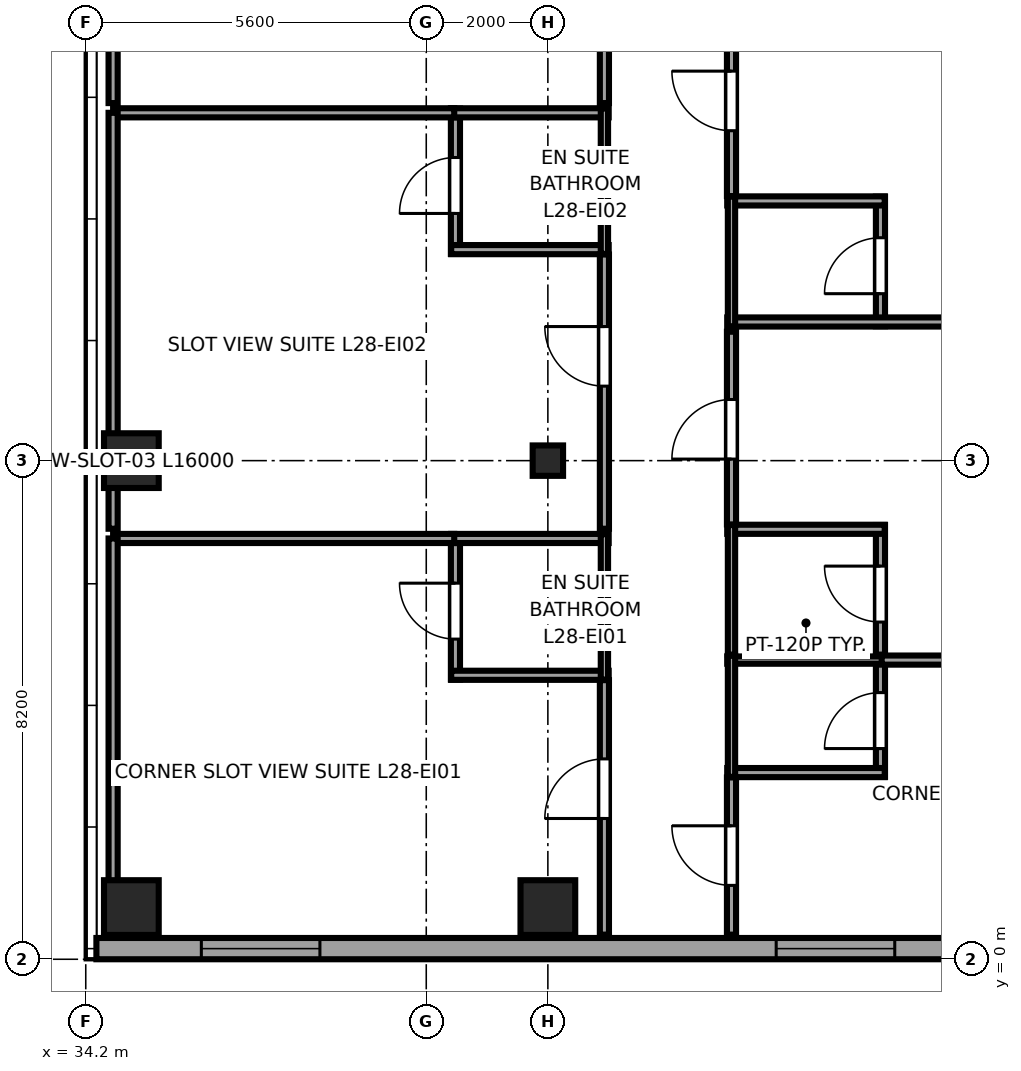
"""IFC4 building model, lengths in metres.
Left out: names, types, materials, properties, quantities, classifications, styles, units other than length and angle.
Written with IfcOpenShell. Run it as: python <this file> out.ifc"""

import sys

from ifc_helpers import new_model, si_unit, direction, frame, frame_2d, origin, origin_2d, place, context, subcontext, project, spatial, rectangle, i_section, extrude, source, transform, mapped, element, fill, save


model = new_model("IFC4")
c1 = context("Model", 3, precision=1e-05, world=origin(), true_north=direction((0.0, 1.0)))
c2 = subcontext(c1, "Body", "Model", "MODEL_VIEW")
j1 = project(units=[si_unit("LENGTHUNIT", "METRE"), si_unit("PLANEANGLEUNIT", "RADIAN")], contexts=[c1])
p1 = place(None, origin())
s1 = spatial("IfcSite", under=j1, at=p1, CompositionType="ELEMENT")
p2 = place(p1, origin())
s2 = spatial("IfcBuilding", under=s1, at=p2, CompositionType="ELEMENT")
p3 = place(p2, frame((0.0, 0.0, 111.55)))
s3 = spatial("IfcBuildingStorey", under=s2, at=p3, CompositionType="ELEMENT", Elevation=111.55)
m1 = source(origin(), c2, "Body", "SweptSolid", [
    extrude(rectangle(XDim=0.9, YDim=0.9, at=origin_2d()), origin(), (0.0, 0.0, 1.0), 3.55),
])
for number, where, z_axis, x_axis in (
    (1, (34.95, 0.85, 0.0), (0.0, 0.0, 1.0), (1.0, 0.0, 0.0)),
    (2, (34.95, 8.2, 0.0), (0.0, 0.0, 1.0), (1.0, 0.0, 0.0)),
    (3, (41.8, 0.85, 0.0), (0.0, 0.0, 1.0), (1.0, 0.0, 0.0)),
):
    element("IfcColumn", number, at=place(p3, frame(where, z_axis=z_axis, x_axis=x_axis)), inside=s3, PredefinedType="COLUMN", context=c2, shape_type="MappedRepresentation", body=[
        mapped(m1, transform((0.0, 0.0, 0.0), x_axis=(1.0, 0.0, 0.0), y_axis=(0.0, 1.0, 0.0), z_axis=(0.0, 0.0, 1.0), scale=1.0)),
    ])
m2 = source(origin(), c2, "Body", "SweptSolid", [
    extrude(i_section(OverallWidth=0.5, OverallDepth=0.5, WebThickness=0.022, FlangeThickness=0.034, at=origin_2d()), origin(), (0.0, 0.0, 1.0), 3.55),
])
p4 = place(p3, frame((41.8, 8.2, 0.0), z_axis=(0.0, 0.0, 1.0), x_axis=(1.0, 0.0, 0.0)))
e4 = element("IfcColumn", 4, at=p4, inside=s3, PredefinedType="COLUMN", context=c2, shape_type="MappedRepresentation", body=[
    mapped(m2, transform((0.0, 0.0, 0.0), x_axis=(1.0, 0.0, 0.0), y_axis=(0.0, 1.0, 0.0), z_axis=(0.0, 0.0, 1.0), scale=1.0)),
])
p5 = place(p3, frame((34.375, 0.175, 0.0), z_axis=(0.0, 0.0, 1.0), x_axis=(1.0, 0.0, 0.0)))
e5 = element("IfcWall", 5, at=p5, inside=s3, PredefinedType="SOLIDWALL", context=c2, shape_type="SweptSolid", body=[
    extrude(rectangle(XDim=18.008, YDim=0.35, at=frame_2d((9.004, 0.0))), origin(), (0.0, 0.0, 1.0), 3.37),
])
p6 = place(p5, frame((1.726, 0.0, 0.68)))
e6 = element("IfcOpeningElement", 6, at=p6, cuts=e5, PredefinedType="OPENING", context=c2, shape_type="SweptSolid", body=[
    extrude(rectangle(XDim=1.95, YDim=1.82, at=frame_2d((0.975, 0.91))), frame((0.0, 0.185, 0.0), z_axis=(0.0, -1.0, 0.0), x_axis=(1.0, 0.0, 0.0)), (0.0, 0.0, 1.0), 0.37),
])
p7 = place(p5, frame((11.18, 0.0, 0.68)))
e7 = element("IfcOpeningElement", 7, at=p7, cuts=e5, PredefinedType="OPENING", context=c2, shape_type="SweptSolid", body=[
    extrude(rectangle(XDim=1.95, YDim=1.82, at=frame_2d((0.975, 0.91))), frame((0.0, 0.185, 0.0), z_axis=(0.0, -1.0, 0.0), x_axis=(1.0, 0.0, 0.0)), (0.0, 0.0, 1.0), 0.37),
])
p8 = place(p3, frame((40.28, 4.6, 0.0), z_axis=(0.0, 0.0, 1.0), x_axis=(0.0, 1.0, 0.0)))
e8 = element("IfcWall", 8, at=p8, inside=s3, PredefinedType="PARTITIONING", context=c2, shape_type="SweptSolid", body=[
    extrude(rectangle(XDim=2.39, YDim=0.15, at=frame_2d((1.195, 0.0))), origin(), (0.0, 0.0, 1.0), 3.37),
])
p9 = place(p8, frame((0.665, 0.0, 0.0)))
e9 = element("IfcOpeningElement", 9, at=p9, cuts=e8, PredefinedType="OPENING", context=c2, shape_type="SweptSolid", body=[
    extrude(rectangle(XDim=0.92, YDim=2.01, at=frame_2d((0.46, 1.005))), frame((0.0, 0.085, 0.0), z_axis=(0.0, -1.0, 0.0), x_axis=(1.0, 0.0, 0.0)), (0.0, 0.0, 1.0), 0.17),
])
for number, where, z_axis, x_axis in (
    (10, (40.21, 4.67, 0.0), (0.0, 0.0, 1.0), (1.0, 0.0, 0.0)),
    (11, (40.21, 6.92, 0.0), (0.0, 0.0, 1.0), (1.0, 0.0, 0.0)),
):
    element("IfcWall", number, at=place(p3, frame(where, z_axis=z_axis, x_axis=x_axis)), inside=s3, PredefinedType="PARTITIONING", context=c2, shape_type="SweptSolid", body=[
        extrude(rectangle(XDim=2.59, YDim=0.15, at=frame_2d((1.295, 0.0))), origin(), (0.0, 0.0, 1.0), 3.37),
    ])
p10 = place(p3, frame((42.73, 4.6, 0.0), z_axis=(0.0, 0.0, 1.0), x_axis=(0.0, 1.0, 0.0)))
e12 = element("IfcWall", 12, at=p10, inside=s3, PredefinedType="PLUMBINGWALL", context=c2, shape_type="SweptSolid", body=[
    extrude(rectangle(XDim=2.39, YDim=0.12, at=frame_2d((1.195, 0.0))), origin(), (0.0, 0.0, 1.0), 3.37),
])
p11 = place(p3, frame((40.28, 11.6, 0.0), z_axis=(0.0, 0.0, 1.0), x_axis=(0.0, 1.0, 0.0)))
e13 = element("IfcWall", 13, at=p11, inside=s3, PredefinedType="PARTITIONING", context=c2, shape_type="SweptSolid", body=[
    extrude(rectangle(XDim=2.39, YDim=0.15, at=frame_2d((1.195, 0.0))), origin(), (0.0, 0.0, 1.0), 3.37),
])
p12 = place(p11, frame((0.665, 0.0, 0.0)))
e14 = element("IfcOpeningElement", 14, at=p12, cuts=e13, PredefinedType="OPENING", context=c2, shape_type="SweptSolid", body=[
    extrude(rectangle(XDim=0.92, YDim=2.01, at=frame_2d((0.46, 1.005))), frame((0.0, 0.085, 0.0), z_axis=(0.0, -1.0, 0.0), x_axis=(1.0, 0.0, 0.0)), (0.0, 0.0, 1.0), 0.17),
])
for number, where, z_axis, x_axis in (
    (15, (40.21, 11.67, 0.0), (0.0, 0.0, 1.0), (1.0, 0.0, 0.0)),
    (16, (40.21, 13.92, 0.0), (0.0, 0.0, 1.0), (1.0, 0.0, 0.0)),
):
    element("IfcWall", number, at=place(p3, frame(where, z_axis=z_axis, x_axis=x_axis)), inside=s3, PredefinedType="PARTITIONING", context=c2, shape_type="SweptSolid", body=[
        extrude(rectangle(XDim=2.59, YDim=0.15, at=frame_2d((1.295, 0.0))), origin(), (0.0, 0.0, 1.0), 3.37),
    ])
p13 = place(p3, frame((42.73, 11.6, 0.0), z_axis=(0.0, 0.0, 1.0), x_axis=(0.0, 1.0, 0.0)))
e17 = element("IfcWall", 17, at=p13, inside=s3, PredefinedType="PLUMBINGWALL", context=c2, shape_type="SweptSolid", body=[
    extrude(rectangle(XDim=2.39, YDim=0.12, at=frame_2d((1.195, 0.0))), origin(), (0.0, 0.0, 1.0), 3.37),
])
p14 = place(p3, frame((47.27, 3.0, 0.0), z_axis=(0.0, 0.0, 1.0), x_axis=(0.0, 1.0, 0.0)))
e18 = element("IfcWall", 18, at=p14, inside=s3, PredefinedType="PARTITIONING", context=c2, shape_type="SweptSolid", body=[
    extrude(rectangle(XDim=1.99, YDim=0.15, at=frame_2d((0.995, 0.0))), origin(), (0.0, 0.0, 1.0), 3.37),
])
p15 = place(p14, frame((0.465, 0.0, 0.0)))
e19 = element("IfcOpeningElement", 19, at=p15, cuts=e18, PredefinedType="OPENING", context=c2, shape_type="SweptSolid", body=[
    extrude(rectangle(XDim=0.92, YDim=2.01, at=frame_2d((0.46, 1.005))), frame((0.0, 0.085, 0.0), z_axis=(0.0, -1.0, 0.0), x_axis=(1.0, 0.0, 0.0)), (0.0, 0.0, 1.0), 0.17),
])
p16 = place(p3, frame((44.75, 3.07, 0.0), z_axis=(0.0, 0.0, 1.0), x_axis=(1.0, 0.0, 0.0)))
e20 = element("IfcWall", 20, at=p16, inside=s3, PredefinedType="PARTITIONING", context=c2, shape_type="SweptSolid", body=[
    extrude(rectangle(XDim=2.59, YDim=0.15, at=frame_2d((1.295, 0.0))), origin(), (0.0, 0.0, 1.0), 3.37),
])
p17 = place(p3, frame((44.75, 4.92, 0.0), z_axis=(0.0, 0.0, 1.0), x_axis=(1.0, 0.0, 0.0)))
e21 = element("IfcWall", 21, at=p17, inside=s3, PredefinedType="PLUMBINGWALL", context=c2, shape_type="SweptSolid", body=[
    extrude(rectangle(XDim=2.59, YDim=0.12, at=frame_2d((1.295, 0.0))), origin(), (0.0, 0.0, 1.0), 3.37),
])
p18 = place(p3, frame((44.82, 3.0, 0.0), z_axis=(0.0, 0.0, 1.0), x_axis=(0.0, 1.0, 0.0)))
e22 = element("IfcWall", 22, at=p18, inside=s3, PredefinedType="PLUMBINGWALL", context=c2, shape_type="SweptSolid", body=[
    extrude(rectangle(XDim=1.99, YDim=0.12, at=frame_2d((0.995, 0.0))), origin(), (0.0, 0.0, 1.0), 3.37),
])
p19 = place(p3, frame((47.27, 5.01, 0.0), z_axis=(0.0, 0.0, 1.0), x_axis=(0.0, 1.0, 0.0)))
e23 = element("IfcWall", 23, at=p19, inside=s3, PredefinedType="PARTITIONING", context=c2, shape_type="SweptSolid", body=[
    extrude(rectangle(XDim=2.131, YDim=0.15, at=frame_2d((1.065, 0.0))), origin(), (0.0, 0.0, 1.0), 3.37),
])
p20 = place(p19, frame((0.535, 0.0, 0.0)))
e24 = element("IfcOpeningElement", 24, at=p20, cuts=e23, PredefinedType="OPENING", context=c2, shape_type="SweptSolid", body=[
    extrude(rectangle(XDim=0.92, YDim=2.01, at=frame_2d((0.46, 1.005))), frame((0.0, 0.085, 0.0), z_axis=(0.0, -1.0, 0.0), x_axis=(1.0, 0.0, 0.0)), (0.0, 0.0, 1.0), 0.17),
])
p21 = place(p3, frame((44.75, 7.071, 0.0), z_axis=(0.0, 0.0, 1.0), x_axis=(1.0, 0.0, 0.0)))
e25 = element("IfcWall", 25, at=p21, inside=s3, PredefinedType="PARTITIONING", context=c2, shape_type="SweptSolid", body=[
    extrude(rectangle(XDim=2.59, YDim=0.15, at=frame_2d((1.295, 0.0))), origin(), (0.0, 0.0, 1.0), 3.37),
])
p22 = place(p3, frame((44.82, 5.01, 0.0), z_axis=(0.0, 0.0, 1.0), x_axis=(0.0, 1.0, 0.0)))
e26 = element("IfcWall", 26, at=p22, inside=s3, PredefinedType="PLUMBINGWALL", context=c2, shape_type="SweptSolid", body=[
    extrude(rectangle(XDim=2.131, YDim=0.12, at=frame_2d((1.065, 0.0))), origin(), (0.0, 0.0, 1.0), 3.37),
])
p23 = place(p3, frame((47.27, 10.41, 0.0), z_axis=(0.0, 0.0, 1.0), x_axis=(0.0, 1.0, 0.0)))
e27 = element("IfcWall", 27, at=p23, inside=s3, PredefinedType="PARTITIONING", context=c2, shape_type="SweptSolid", body=[
    extrude(rectangle(XDim=2.131, YDim=0.15, at=frame_2d((1.065, 0.0))), origin(), (0.0, 0.0, 1.0), 3.37),
])
p24 = place(p23, frame((0.535, 0.0, 0.0)))
e28 = element("IfcOpeningElement", 28, at=p24, cuts=e27, PredefinedType="OPENING", context=c2, shape_type="SweptSolid", body=[
    extrude(rectangle(XDim=0.92, YDim=2.01, at=frame_2d((0.46, 1.005))), frame((0.0, 0.085, 0.0), z_axis=(0.0, -1.0, 0.0), x_axis=(1.0, 0.0, 0.0)), (0.0, 0.0, 1.0), 0.17),
])
p25 = place(p3, frame((44.75, 10.48, 0.0), z_axis=(0.0, 0.0, 1.0), x_axis=(1.0, 0.0, 0.0)))
e29 = element("IfcWall", 29, at=p25, inside=s3, PredefinedType="PARTITIONING", context=c2, shape_type="SweptSolid", body=[
    extrude(rectangle(XDim=11.845, YDim=0.15, at=frame_2d((5.922, 0.0))), origin(), (0.0, 0.0, 1.0), 3.37),
])
p26 = place(p3, frame((44.75, 12.471, 0.0), z_axis=(0.0, 0.0, 1.0), x_axis=(1.0, 0.0, 0.0)))
e30 = element("IfcWall", 30, at=p26, inside=s3, PredefinedType="PARTITIONING", context=c2, shape_type="SweptSolid", body=[
    extrude(rectangle(XDim=2.59, YDim=0.15, at=frame_2d((1.295, 0.0))), origin(), (0.0, 0.0, 1.0), 3.37),
])
p27 = place(p3, frame((44.82, 10.41, 0.0), z_axis=(0.0, 0.0, 1.0), x_axis=(0.0, 1.0, 0.0)))
e31 = element("IfcWall", 31, at=p27, inside=s3, PredefinedType="PLUMBINGWALL", context=c2, shape_type="SweptSolid", body=[
    extrude(rectangle(XDim=2.131, YDim=0.12, at=frame_2d((1.065, 0.0))), origin(), (0.0, 0.0, 1.0), 3.37),
])
p28 = place(p3, frame((42.73, 0.405, 0.0), z_axis=(0.0, 0.0, 1.0), x_axis=(0.0, 1.0, 0.0)))
e32 = element("IfcWall", 32, at=p28, inside=s3, PredefinedType="PARTITIONING", context=c2, shape_type="SweptSolid", body=[
    extrude(rectangle(XDim=4.185, YDim=0.15, at=frame_2d((2.093, 0.0))), origin(), (0.0, 0.0, 1.0), 3.37),
])
p29 = place(p28, frame((1.91, 0.0, 0.0)))
e33 = element("IfcOpeningElement", 33, at=p29, cuts=e32, PredefinedType="OPENING", context=c2, shape_type="SweptSolid", body=[
    extrude(rectangle(XDim=0.98, YDim=2.12, at=frame_2d((0.49, 1.06))), frame((0.0, 0.085, 0.0), z_axis=(0.0, -1.0, 0.0), x_axis=(1.0, 0.0, 0.0)), (0.0, 0.0, 1.0), 0.17),
])
p30 = place(p3, frame((34.65, 6.92, 0.0), z_axis=(0.0, 0.0, 1.0), x_axis=(1.0, 0.0, 0.0)))
e34 = element("IfcWall", 34, at=p30, inside=s3, PredefinedType="PARTITIONING", context=c2, shape_type="SweptSolid", body=[
    extrude(rectangle(XDim=5.61, YDim=0.15, at=frame_2d((2.805, 0.0))), origin(), (0.0, 0.0, 1.0), 3.37),
])
p31 = place(p3, frame((34.65, 0.405, 0.0), z_axis=(0.0, 0.0, 1.0), x_axis=(0.0, 1.0, 0.0)))
e35 = element("IfcWall", 35, at=p31, inside=s3, PredefinedType="PARTITIONING", context=c2, shape_type="SweptSolid", body=[
    extrude(rectangle(XDim=6.515, YDim=0.15, at=frame_2d((3.257, 0.0))), origin(), (0.0, 0.0, 1.0), 3.37),
])
p32 = place(p3, frame((42.73, 7.08, 0.0), z_axis=(0.0, 0.0, 1.0), x_axis=(0.0, 1.0, 0.0)))
e36 = element("IfcWall", 36, at=p32, inside=s3, PredefinedType="PARTITIONING", context=c2, shape_type="SweptSolid", body=[
    extrude(rectangle(XDim=4.51, YDim=0.15, at=frame_2d((2.255, 0.0))), origin(), (0.0, 0.0, 1.0), 3.37),
])
p33 = place(p32, frame((2.345, 0.0, 0.0)))
e37 = element("IfcOpeningElement", 37, at=p33, cuts=e36, PredefinedType="OPENING", context=c2, shape_type="SweptSolid", body=[
    extrude(rectangle(XDim=0.98, YDim=2.12, at=frame_2d((0.49, 1.06))), frame((0.0, 0.085, 0.0), z_axis=(0.0, -1.0, 0.0), x_axis=(1.0, 0.0, 0.0)), (0.0, 0.0, 1.0), 0.17),
])
p34 = place(p3, frame((34.65, 13.92, 0.0), z_axis=(0.0, 0.0, 1.0), x_axis=(1.0, 0.0, 0.0)))
e38 = element("IfcWall", 38, at=p34, inside=s3, PredefinedType="PARTITIONING", context=c2, shape_type="SweptSolid", body=[
    extrude(rectangle(XDim=5.61, YDim=0.15, at=frame_2d((2.805, 0.0))), origin(), (0.0, 0.0, 1.0), 3.37),
])
p35 = place(p3, frame((34.65, 7.08, 0.0), z_axis=(0.0, 0.0, 1.0), x_axis=(0.0, 1.0, 0.0)))
e39 = element("IfcWall", 39, at=p35, inside=s3, PredefinedType="PARTITIONING", context=c2, shape_type="SweptSolid", body=[
    extrude(rectangle(XDim=6.84, YDim=0.15, at=frame_2d((3.42, 0.0))), origin(), (0.0, 0.0, 1.0), 3.37),
])
p36 = place(p3, frame((42.73, 14.08, 0.0), z_axis=(0.0, 0.0, 1.0), x_axis=(0.0, 1.0, 0.0)))
e40 = element("IfcWall", 40, at=p36, inside=s3, PredefinedType="PARTITIONING", context=c2, shape_type="SweptSolid", body=[
    extrude(rectangle(XDim=4.61, YDim=0.15, at=frame_2d((2.305, 0.0))), origin(), (0.0, 0.0, 1.0), 3.37),
])
p37 = place(p36, frame((3.145, 0.0, 0.0)))
e41 = element("IfcOpeningElement", 41, at=p37, cuts=e40, PredefinedType="OPENING", context=c2, shape_type="SweptSolid", body=[
    extrude(rectangle(XDim=0.98, YDim=2.12, at=frame_2d((0.49, 1.06))), frame((0.0, 0.085, 0.0), z_axis=(0.0, -1.0, 0.0), x_axis=(1.0, 0.0, 0.0)), (0.0, 0.0, 1.0), 0.17),
])
p38 = place(p3, frame((34.65, 14.08, 0.0), z_axis=(0.0, 0.0, 1.0), x_axis=(0.0, 1.0, 0.0)))
e42 = element("IfcWall", 42, at=p38, inside=s3, PredefinedType="PARTITIONING", context=c2, shape_type="SweptSolid", body=[
    extrude(rectangle(XDim=6.94, YDim=0.15, at=frame_2d((3.47, 0.0))), origin(), (0.0, 0.0, 1.0), 3.37),
])
p39 = place(p3, frame((44.82, 0.405, 0.0), z_axis=(0.0, 0.0, 1.0), x_axis=(0.0, 1.0, 0.0)))
e43 = element("IfcWall", 43, at=p39, inside=s3, PredefinedType="PARTITIONING", context=c2, shape_type="SweptSolid", body=[
    extrude(rectangle(XDim=2.585, YDim=0.15, at=frame_2d((1.292, 0.0))), origin(), (0.0, 0.0, 1.0), 3.37),
])
p40 = place(p39, frame((0.81, 0.0, 0.0)))
e44 = element("IfcOpeningElement", 44, at=p40, cuts=e43, PredefinedType="OPENING", context=c2, shape_type="SweptSolid", body=[
    extrude(rectangle(XDim=0.98, YDim=2.12, at=frame_2d((0.49, 1.06))), frame((0.0, 0.085, 0.0), z_axis=(0.0, -1.0, 0.0), x_axis=(1.0, 0.0, 0.0)), (0.0, 0.0, 1.0), 0.17),
])
p41 = place(p3, frame((47.29, 4.92, 0.0), z_axis=(0.0, 0.0, 1.0), x_axis=(1.0, 0.0, 0.0)))
e45 = element("IfcWall", 45, at=p41, inside=s3, PredefinedType="PARTITIONING", context=c2, shape_type="SweptSolid", body=[
    extrude(rectangle(XDim=9.305, YDim=0.15, at=frame_2d((4.652, 0.0))), origin(), (0.0, 0.0, 1.0), 3.37),
])
p42 = place(p3, frame((44.82, 7.151, 0.0), z_axis=(0.0, 0.0, 1.0), x_axis=(0.0, 1.0, 0.0)))
e46 = element("IfcWall", 46, at=p42, inside=s3, PredefinedType="PARTITIONING", context=c2, shape_type="SweptSolid", body=[
    extrude(rectangle(XDim=3.169, YDim=0.15, at=frame_2d((1.584, 0.0))), origin(), (0.0, 0.0, 1.0), 3.37),
])
p43 = place(p42, frame((1.074, 0.0, 0.0)))
e47 = element("IfcOpeningElement", 47, at=p43, cuts=e46, PredefinedType="OPENING", context=c2, shape_type="SweptSolid", body=[
    extrude(rectangle(XDim=0.98, YDim=2.12, at=frame_2d((0.49, 1.06))), frame((0.0, 0.085, 0.0), z_axis=(0.0, -1.0, 0.0), x_axis=(1.0, 0.0, 0.0)), (0.0, 0.0, 1.0), 0.17),
])
p44 = place(p3, frame((44.82, 12.551, 0.0), z_axis=(0.0, 0.0, 1.0), x_axis=(0.0, 1.0, 0.0)))
e48 = element("IfcWall", 48, at=p44, inside=s3, PredefinedType="PARTITIONING", context=c2, shape_type="SweptSolid", body=[
    extrude(rectangle(XDim=3.169, YDim=0.15, at=frame_2d((1.584, 0.0))), origin(), (0.0, 0.0, 1.0), 3.37),
])
p45 = place(p44, frame((1.074, 0.0, 0.0)))
e49 = element("IfcOpeningElement", 49, at=p45, cuts=e48, PredefinedType="OPENING", context=c2, shape_type="SweptSolid", body=[
    extrude(rectangle(XDim=0.98, YDim=2.12, at=frame_2d((0.49, 1.06))), frame((0.0, 0.085, 0.0), z_axis=(0.0, -1.0, 0.0), x_axis=(1.0, 0.0, 0.0)), (0.0, 0.0, 1.0), 0.17),
])
m3 = source(origin(), c2, "Body", "SweptSolid", [
    extrude(rectangle(XDim=1.95, YDim=1.82, at=frame_2d((0.975, 0.91))), frame((0.0, 0.09, 0.0), z_axis=(0.0, -1.0, 0.0), x_axis=(1.0, 0.0, 0.0)), (0.0, 0.0, 1.0), 0.06),
])
p46 = place(p6, origin())
e50 = element("IfcWindow", 50, at=p46, inside=s3, PartitioningType="DOUBLE_PANEL_VERTICAL", PredefinedType="WINDOW", context=c2, shape_type="MappedRepresentation", body=[
    mapped(m3, transform((0.0, 0.0, 0.0), x_axis=(1.0, 0.0, 0.0), y_axis=(0.0, 1.0, 0.0), z_axis=(0.0, 0.0, 1.0), scale=1.0)),
])
fill(e6, e50)
p47 = place(p7, origin())
e51 = element("IfcWindow", 51, at=p47, inside=s3, PartitioningType="DOUBLE_PANEL_VERTICAL", PredefinedType="WINDOW", context=c2, shape_type="MappedRepresentation", body=[
    mapped(m3, transform((0.0, 0.0, 0.0), x_axis=(1.0, 0.0, 0.0), y_axis=(0.0, 1.0, 0.0), z_axis=(0.0, 0.0, 1.0), scale=1.0)),
])
fill(e7, e51)
m4 = source(origin(), c2, "Body", "SweptSolid", [
    extrude(rectangle(XDim=0.92, YDim=2.01, at=frame_2d((0.46, 1.005))), frame((0.0, 0.025, 0.0), z_axis=(0.0, -1.0, 0.0), x_axis=(1.0, 0.0, 0.0)), (0.0, 0.0, 1.0), 0.05),
])
p48 = place(p9, origin())
e52 = element("IfcDoor", 52, at=p48, inside=s3, OperationType="SINGLE_SWING_RIGHT", PredefinedType="DOOR", context=c2, shape_type="MappedRepresentation", body=[
    mapped(m4, transform((0.0, 0.0, 0.0), x_axis=(1.0, 0.0, 0.0), y_axis=(0.0, 1.0, 0.0), z_axis=(0.0, 0.0, 1.0), scale=1.0)),
])
fill(e9, e52)
p49 = place(p12, origin())
e53 = element("IfcDoor", 53, at=p49, inside=s3, OperationType="SINGLE_SWING_LEFT", PredefinedType="DOOR", context=c2, shape_type="MappedRepresentation", body=[
    mapped(m4, transform((0.0, 0.0, 0.0), x_axis=(1.0, 0.0, 0.0), y_axis=(0.0, 1.0, 0.0), z_axis=(0.0, 0.0, 1.0), scale=1.0)),
])
fill(e14, e53)
p50 = place(p15, origin())
e54 = element("IfcDoor", 54, at=p50, inside=s3, OperationType="SINGLE_SWING_LEFT", PredefinedType="DOOR", context=c2, shape_type="MappedRepresentation", body=[
    mapped(m4, transform((0.0, 0.0, 0.0), x_axis=(1.0, 0.0, 0.0), y_axis=(0.0, 1.0, 0.0), z_axis=(0.0, 0.0, 1.0), scale=1.0)),
])
fill(e19, e54)
p51 = place(p20, origin())
e55 = element("IfcDoor", 55, at=p51, inside=s3, OperationType="SINGLE_SWING_RIGHT", PredefinedType="DOOR", context=c2, shape_type="MappedRepresentation", body=[
    mapped(m4, transform((0.0, 0.0, 0.0), x_axis=(1.0, 0.0, 0.0), y_axis=(0.0, 1.0, 0.0), z_axis=(0.0, 0.0, 1.0), scale=1.0)),
])
fill(e24, e55)
p52 = place(p24, origin())
e56 = element("IfcDoor", 56, at=p52, inside=s3, OperationType="SINGLE_SWING_LEFT", PredefinedType="DOOR", context=c2, shape_type="MappedRepresentation", body=[
    mapped(m4, transform((0.0, 0.0, 0.0), x_axis=(1.0, 0.0, 0.0), y_axis=(0.0, 1.0, 0.0), z_axis=(0.0, 0.0, 1.0), scale=1.0)),
])
fill(e28, e56)
m5 = source(origin(), c2, "Body", "SweptSolid", [
    extrude(rectangle(XDim=0.98, YDim=2.12, at=frame_2d((0.49, 1.06))), frame((0.0, 0.025, 0.0), z_axis=(0.0, -1.0, 0.0), x_axis=(1.0, 0.0, 0.0)), (0.0, 0.0, 1.0), 0.05),
])
p53 = place(p29, origin())
e57 = element("IfcDoor", 57, at=p53, inside=s3, OperationType="SINGLE_SWING_LEFT", PredefinedType="DOOR", context=c2, shape_type="MappedRepresentation", body=[
    mapped(m5, transform((0.0, 0.0, 0.0), x_axis=(1.0, 0.0, 0.0), y_axis=(0.0, 1.0, 0.0), z_axis=(0.0, 0.0, 1.0), scale=1.0)),
])
fill(e33, e57)
p54 = place(p33, origin())
e58 = element("IfcDoor", 58, at=p54, inside=s3, OperationType="SINGLE_SWING_RIGHT", PredefinedType="DOOR", context=c2, shape_type="MappedRepresentation", body=[
    mapped(m5, transform((0.0, 0.0, 0.0), x_axis=(1.0, 0.0, 0.0), y_axis=(0.0, 1.0, 0.0), z_axis=(0.0, 0.0, 1.0), scale=1.0)),
])
fill(e37, e58)
p55 = place(p40, origin())
e59 = element("IfcDoor", 59, at=p55, inside=s3, OperationType="SINGLE_SWING_RIGHT", PredefinedType="DOOR", context=c2, shape_type="MappedRepresentation", body=[
    mapped(m5, transform((0.0, 0.0, 0.0), x_axis=(1.0, 0.0, 0.0), y_axis=(0.0, 1.0, 0.0), z_axis=(0.0, 0.0, 1.0), scale=1.0)),
])
fill(e44, e59)
p56 = place(p43, origin())
e60 = element("IfcDoor", 60, at=p56, inside=s3, OperationType="SINGLE_SWING_LEFT", PredefinedType="DOOR", context=c2, shape_type="MappedRepresentation", body=[
    mapped(m5, transform((0.0, 0.0, 0.0), x_axis=(1.0, 0.0, 0.0), y_axis=(0.0, 1.0, 0.0), z_axis=(0.0, 0.0, 1.0), scale=1.0)),
])
fill(e47, e60)
p57 = place(p45, origin())
e61 = element("IfcDoor", 61, at=p57, inside=s3, OperationType="SINGLE_SWING_RIGHT", PredefinedType="DOOR", context=c2, shape_type="MappedRepresentation", body=[
    mapped(m5, transform((0.0, 0.0, 0.0), x_axis=(1.0, 0.0, 0.0), y_axis=(0.0, 1.0, 0.0), z_axis=(0.0, 0.0, 1.0), scale=1.0)),
])
fill(e49, e61)
save(model, sys.argv[1])
